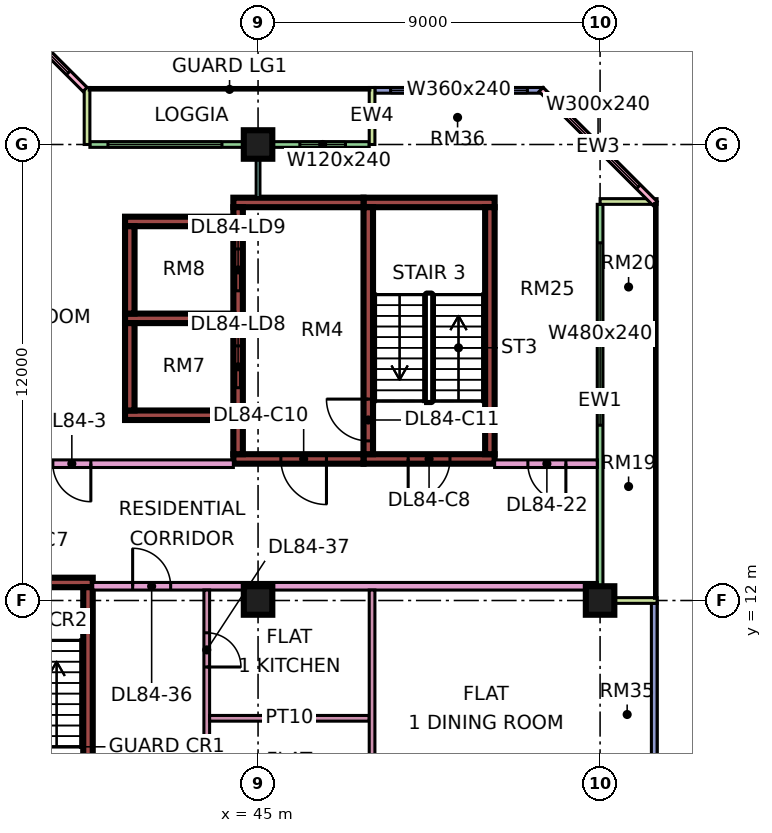
"""IFC4 building model, lengths in metres.
Left out: names, types, materials, properties, quantities, classifications, styles, units other than length and angle.
Written with IfcOpenShell. Run it as: python <this file> out.ifc"""

import sys

from ifc_helpers import new_model, si_unit, direction, frame, frame_2d, origin, origin_2d, place, context, subcontext, project, spatial, rectangle, extrude, element, fill, save


model = new_model("IFC4")
c1 = context("Model", 3, precision=1e-05, world=origin(), true_north=direction((0.0, 1.0)))
c2 = subcontext(c1, "Body", "Model", "MODEL_VIEW")
j1 = project(units=[si_unit("LENGTHUNIT", "METRE"), si_unit("PLANEANGLEUNIT", "RADIAN")], contexts=[c1])
p1 = place(None, origin())
s1 = spatial("IfcSite", under=j1, at=p1, CompositionType="ELEMENT")
p2 = place(p1, origin())
s2 = spatial("IfcBuilding", under=s1, at=p2, CompositionType="ELEMENT")
p3 = place(p2, frame((0.0, 0.0, 361.4)))
s3 = spatial("IfcBuildingStorey", under=s2, at=p3, CompositionType="ELEMENT", Elevation=361.4)
for number, where, z_axis, x_axis in (
    (1, (45.0, 12.0, 0.0), (0.0, 0.0, 1.0), (1.0, 0.0, 0.0)),
    (2, (45.0, 24.0, 0.0), (0.0, 0.0, 1.0), (1.0, 0.0, 0.0)),
    (3, (54.0, 12.0, 0.0), (0.0, 0.0, 1.0), (1.0, 0.0, 0.0)),
):
    element("IfcColumn", number, at=place(p3, frame(where, z_axis=z_axis, x_axis=x_axis)), inside=s3, PredefinedType="COLUMN", context=c2, shape_type="SweptSolid", body=[
        extrude(rectangle(XDim=0.75, YDim=0.75, at=origin_2d()), origin(), (0.0, 0.0, 1.0), 3.75),
    ])
p4 = place(p3, frame((36.375, 12.475, 0.0), z_axis=(0.0, 0.0, 1.0), x_axis=(1.0, 0.0, 0.0)))
e4 = element("IfcWall", 4, at=p4, inside=s3, PredefinedType="SHEAR", context=c2, shape_type="SweptSolid", body=[
    extrude(rectangle(XDim=4.275, YDim=0.25, at=frame_2d((2.137, 0.0))), origin(), (0.0, 0.0, 1.0), 3.75),
])
p5 = place(p4, frame((2.0, 0.0, 0.0)))
e5 = element("IfcOpeningElement", 5, at=p5, cuts=e4, PredefinedType="OPENING", context=c2, shape_type="SweptSolid", body=[
    extrude(rectangle(XDim=1.1, YDim=2.2, at=frame_2d((0.55, 1.1))), frame((0.0, 0.135, 0.0), z_axis=(0.0, -1.0, 0.0), x_axis=(1.0, 0.0, 0.0)), (0.0, 0.0, 1.0), 0.27),
])
p6 = place(p3, frame((40.525, 5.85, 0.0), z_axis=(0.0, 0.0, 1.0), x_axis=(0.0, 1.0, 0.0)))
e6 = element("IfcWall", 6, at=p6, inside=s3, PredefinedType="SHEAR", context=c2, shape_type="SweptSolid", body=[
    extrude(rectangle(XDim=6.5, YDim=0.25, at=frame_2d((3.25, 0.0))), origin(), (0.0, 0.0, 1.0), 3.75),
])
p7 = place(p3, frame((47.775, 15.725, 0.0), z_axis=(0.0, 0.0, 1.0), x_axis=(1.0, 0.0, 0.0)))
e7 = element("IfcWall", 7, at=p7, inside=s3, PredefinedType="SHEAR", context=c2, shape_type="SweptSolid", body=[
    extrude(rectangle(XDim=3.45, YDim=0.25, at=frame_2d((1.725, 0.0))), origin(), (0.0, 0.0, 1.0), 3.75),
])
p8 = place(p7, frame((1.175, 0.0, 0.0)))
e8 = element("IfcOpeningElement", 8, at=p8, cuts=e7, PredefinedType="OPENING", context=c2, shape_type="SweptSolid", body=[
    extrude(rectangle(XDim=1.1, YDim=2.2, at=frame_2d((0.55, 1.1))), frame((0.0, 0.135, 0.0), z_axis=(0.0, -1.0, 0.0), x_axis=(1.0, 0.0, 0.0)), (0.0, 0.0, 1.0), 0.27),
])
p9 = place(p3, frame((47.775, 22.475, 0.0), z_axis=(0.0, 0.0, 1.0), x_axis=(1.0, 0.0, 0.0)))
e9 = element("IfcWall", 9, at=p9, inside=s3, PredefinedType="SHEAR", context=c2, shape_type="SweptSolid", body=[
    extrude(rectangle(XDim=3.45, YDim=0.25, at=frame_2d((1.725, 0.0))), origin(), (0.0, 0.0, 1.0), 3.75),
])
p10 = place(p3, frame((47.9, 15.85, 0.0), z_axis=(0.0, 0.0, 1.0), x_axis=(0.0, 1.0, 0.0)))
e10 = element("IfcWall", 10, at=p10, inside=s3, PredefinedType="SHEAR", context=c2, shape_type="SweptSolid", body=[
    extrude(rectangle(XDim=6.5, YDim=0.25, at=frame_2d((3.25, 0.0))), origin(), (0.0, 0.0, 1.0), 3.75),
])
p11 = place(p10, frame((0.35, 0.0, 0.0)))
e11 = element("IfcOpeningElement", 11, at=p11, cuts=e10, PredefinedType="OPENING", context=c2, shape_type="SweptSolid", body=[
    extrude(rectangle(XDim=1.1, YDim=2.2, at=frame_2d((0.55, 1.1))), frame((0.0, 0.135, 0.0), z_axis=(0.0, -1.0, 0.0), x_axis=(1.0, 0.0, 0.0)), (0.0, 0.0, 1.0), 0.27),
])
p12 = place(p3, frame((51.1, 15.85, 0.0), z_axis=(0.0, 0.0, 1.0), x_axis=(0.0, 1.0, 0.0)))
e12 = element("IfcWall", 12, at=p12, inside=s3, PredefinedType="SHEAR", context=c2, shape_type="SweptSolid", body=[
    extrude(rectangle(XDim=6.5, YDim=0.25, at=frame_2d((3.25, 0.0))), origin(), (0.0, 0.0, 1.0), 3.75),
])
p13 = place(p3, frame((44.35, 15.725, 0.0), z_axis=(0.0, 0.0, 1.0), x_axis=(1.0, 0.0, 0.0)))
e13 = element("IfcWall", 13, at=p13, inside=s3, PredefinedType="SHEAR", context=c2, shape_type="SweptSolid", body=[
    extrude(rectangle(XDim=3.425, YDim=0.25, at=frame_2d((1.712, 0.0))), origin(), (0.0, 0.0, 1.0), 3.75),
])
p14 = place(p13, frame((1.25, 0.0, 0.0)))
e14 = element("IfcOpeningElement", 14, at=p14, cuts=e13, PredefinedType="OPENING", context=c2, shape_type="SweptSolid", body=[
    extrude(rectangle(XDim=1.2, YDim=2.2, at=frame_2d((0.6, 1.1))), frame((0.0, 0.135, 0.0), z_axis=(0.0, -1.0, 0.0), x_axis=(1.0, 0.0, 0.0)), (0.0, 0.0, 1.0), 0.27),
])
p15 = place(p3, frame((44.35, 22.475, 0.0), z_axis=(0.0, 0.0, 1.0), x_axis=(1.0, 0.0, 0.0)))
e15 = element("IfcWall", 15, at=p15, inside=s3, PredefinedType="SHEAR", context=c2, shape_type="SweptSolid", body=[
    extrude(rectangle(XDim=3.425, YDim=0.25, at=frame_2d((1.712, 0.0))), origin(), (0.0, 0.0, 1.0), 3.75),
])
p16 = place(p3, frame((44.475, 15.85, 0.0), z_axis=(0.0, 0.0, 1.0), x_axis=(0.0, 1.0, 0.0)))
e16 = element("IfcWall", 16, at=p16, inside=s3, PredefinedType="SHEAR", context=c2, shape_type="SweptSolid", body=[
    extrude(rectangle(XDim=6.5, YDim=0.25, at=frame_2d((3.25, 0.0))), origin(), (0.0, 0.0, 1.0), 3.75),
])
p17 = place(p16, frame((1.75, 0.0, 0.0)))
e17 = element("IfcOpeningElement", 17, at=p17, cuts=e16, PredefinedType="OPENING", context=c2, shape_type="SweptSolid", body=[
    extrude(rectangle(XDim=1.1, YDim=2.2, at=frame_2d((0.55, 1.1))), frame((0.0, 0.135, 0.0), z_axis=(0.0, -1.0, 0.0), x_axis=(1.0, 0.0, 0.0)), (0.0, 0.0, 1.0), 0.27),
])
p18 = place(p16, frame((4.3, 0.0, 0.0)))
e18 = element("IfcOpeningElement", 18, at=p18, cuts=e16, PredefinedType="OPENING", context=c2, shape_type="SweptSolid", body=[
    extrude(rectangle(XDim=1.1, YDim=2.2, at=frame_2d((0.55, 1.1))), frame((0.0, 0.135, 0.0), z_axis=(0.0, -1.0, 0.0), x_axis=(1.0, 0.0, 0.0)), (0.0, 0.0, 1.0), 0.27),
])
for number, where, z_axis, x_axis in (
    (19, (41.5, 16.875, 0.0), (0.0, 0.0, 1.0), (1.0, 0.0, 0.0)),
    (20, (41.5, 19.425, 0.0), (0.0, 0.0, 1.0), (1.0, 0.0, 0.0)),
    (21, (41.5, 21.975, 0.0), (0.0, 0.0, 1.0), (1.0, 0.0, 0.0)),
):
    element("IfcWall", number, at=place(p3, frame(where, z_axis=z_axis, x_axis=x_axis)), inside=s3, PredefinedType="SHEAR", context=c2, shape_type="SweptSolid", body=[
        extrude(rectangle(XDim=2.85, YDim=0.25, at=frame_2d((1.425, 0.0))), origin(), (0.0, 0.0, 1.0), 3.75),
    ])
for number, where, z_axis, x_axis in (
    (22, (41.625, 17.0, 0.0), (0.0, 0.0, 1.0), (0.0, 1.0, 0.0)),
    (23, (41.625, 19.55, 0.0), (0.0, 0.0, 1.0), (0.0, 1.0, 0.0)),
):
    element("IfcWall", number, at=place(p3, frame(where, z_axis=z_axis, x_axis=x_axis)), inside=s3, PredefinedType="SHEAR", context=c2, shape_type="SweptSolid", body=[
        extrude(rectangle(XDim=2.3, YDim=0.25, at=frame_2d((1.15, 0.0))), origin(), (0.0, 0.0, 1.0), 3.75),
    ])
p19 = place(p3, frame((52.5, 25.425, 0.0), z_axis=(0.0, 0.0, 1.0), x_axis=(-1.0, 0.0, 0.0)))
e24 = element("IfcWall", 24, at=p19, inside=s3, PredefinedType="SOLIDWALL", context=c2, shape_type="SweptSolid", body=[
    extrude(rectangle(XDim=4.425, YDim=0.15, at=frame_2d((2.212, 0.0))), origin(), (0.0, 0.0, 1.0), 3.35),
])
p20 = place(p19, frame((0.413, 0.0, 0.45)))
e25 = element("IfcOpeningElement", 25, at=p20, cuts=e24, PredefinedType="OPENING", context=c2, shape_type="SweptSolid", body=[
    extrude(rectangle(XDim=3.6, YDim=2.4, at=frame_2d((1.8, 1.2))), frame((0.0, 0.085, 0.0), z_axis=(0.0, -1.0, 0.0), x_axis=(1.0, 0.0, 0.0)), (0.0, 0.0, 1.0), 0.17),
])
p21 = place(p3, frame((47.925, 24.0, 0.0), z_axis=(0.0, 0.0, 1.0), x_axis=(-1.0, 0.0, 0.0)))
e26 = element("IfcWall", 26, at=p21, inside=s3, PredefinedType="SOLIDWALL", context=c2, shape_type="SweptSolid", body=[
    extrude(rectangle(XDim=7.35, YDim=0.15, at=frame_2d((3.675, 0.0))), origin(), (0.0, 0.0, 1.0), 3.35),
])
p22 = place(p21, frame((0.625, 0.0, 0.45)))
e27 = element("IfcOpeningElement", 27, at=p22, cuts=e26, PredefinedType="OPENING", context=c2, shape_type="SweptSolid", body=[
    extrude(rectangle(XDim=1.2, YDim=2.4, at=frame_2d((0.6, 1.2))), frame((0.0, 0.085, 0.0), z_axis=(0.0, -1.0, 0.0), x_axis=(1.0, 0.0, 0.0)), (0.0, 0.0, 1.0), 0.17),
])
p23 = place(p21, frame((3.875, 0.0, 0.45)))
e28 = element("IfcOpeningElement", 28, at=p23, cuts=e26, PredefinedType="OPENING", context=c2, shape_type="SweptSolid", body=[
    extrude(rectangle(XDim=3.0, YDim=2.4, at=frame_2d((1.5, 1.2))), frame((0.0, 0.085, 0.0), z_axis=(0.0, -1.0, 0.0), x_axis=(1.0, 0.0, 0.0)), (0.0, 0.0, 1.0), 0.17),
])
for number, where, z_axis, x_axis in (
    (29, (48.0, 25.5, 0.0), (0.0, 0.0, 1.0), (0.0, -1.0, 0.0)),
    (30, (40.5, 25.5, 0.0), (0.0, 0.0, 1.0), (0.0, -1.0, 0.0)),
):
    element("IfcWall", number, at=place(p3, frame(where, z_axis=z_axis, x_axis=x_axis)), inside=s3, PredefinedType="SOLIDWALL", context=c2, shape_type="SweptSolid", body=[
        extrude(rectangle(XDim=1.5, YDim=0.15, at=frame_2d((0.75, 0.0))), origin(), (0.0, 0.0, 1.0), 3.35),
    ])
p24 = place(p3, frame((40.447, 25.447, 0.0), z_axis=(0.0, 0.0, 1.0), x_axis=(-0.707106781187, 0.707106781187, 0.0)))
e31 = element("IfcWall", 31, at=p24, inside=s3, PredefinedType="SOLIDWALL", context=c2, shape_type="SweptSolid", body=[
    extrude(rectangle(XDim=4.243, YDim=0.15, at=frame_2d((2.121, 0.0))), origin(), (0.0, 0.0, 1.0), 3.35),
])
p25 = place(p24, frame((0.621, 0.0, 0.45)))
e32 = element("IfcOpeningElement", 32, at=p25, cuts=e31, PredefinedType="OPENING", context=c2, shape_type="SweptSolid", body=[
    extrude(rectangle(XDim=3.0, YDim=2.4, at=frame_2d((1.5, 1.2))), frame((0.0, 0.085, 0.0), z_axis=(0.0, -1.0, 0.0), x_axis=(1.0, 0.0, 0.0)), (0.0, 0.0, 1.0), 0.17),
])
p26 = place(p3, frame((55.425, 1.5, 0.0), z_axis=(0.0, 0.0, 1.0), x_axis=(0.0, 1.0, 0.0)))
e33 = element("IfcWall", 33, at=p26, inside=s3, PredefinedType="SOLIDWALL", context=c2, shape_type="SweptSolid", body=[
    extrude(rectangle(XDim=10.425, YDim=0.15, at=frame_2d((5.212, 0.0))), origin(), (0.0, 0.0, 1.0), 3.35),
])
p27 = place(p26, frame((0.4, 0.0, 0.45)))
e34 = element("IfcOpeningElement", 34, at=p27, cuts=e33, PredefinedType="OPENING", context=c2, shape_type="SweptSolid", body=[
    extrude(rectangle(XDim=2.4, YDim=2.4, at=frame_2d((1.2, 1.2))), frame((0.0, 0.085, 0.0), z_axis=(0.0, -1.0, 0.0), x_axis=(1.0, 0.0, 0.0)), (0.0, 0.0, 1.0), 0.17),
])
p28 = place(p3, frame((54.0, 12.075, 0.0), z_axis=(0.0, 0.0, 1.0), x_axis=(0.0, 1.0, 0.0)))
e35 = element("IfcWall", 35, at=p28, inside=s3, PredefinedType="SOLIDWALL", context=c2, shape_type="SweptSolid", body=[
    extrude(rectangle(XDim=10.35, YDim=0.15, at=frame_2d((5.175, 0.0))), origin(), (0.0, 0.0, 1.0), 3.35),
])
p29 = place(p28, frame((4.538, 0.0, 0.45)))
e36 = element("IfcOpeningElement", 36, at=p29, cuts=e35, PredefinedType="OPENING", context=c2, shape_type="SweptSolid", body=[
    extrude(rectangle(XDim=4.8, YDim=2.4, at=frame_2d((2.4, 1.2))), frame((0.0, 0.085, 0.0), z_axis=(0.0, -1.0, 0.0), x_axis=(1.0, 0.0, 0.0)), (0.0, 0.0, 1.0), 0.17),
])
for number, where, z_axis, x_axis in (
    (37, (55.5, 12.0, 0.0), (0.0, 0.0, 1.0), (-1.0, 0.0, 0.0)),
    (38, (55.5, 22.5, 0.0), (0.0, 0.0, 1.0), (-1.0, 0.0, 0.0)),
):
    element("IfcWall", number, at=place(p3, frame(where, z_axis=z_axis, x_axis=x_axis)), inside=s3, PredefinedType="SOLIDWALL", context=c2, shape_type="SweptSolid", body=[
        extrude(rectangle(XDim=1.5, YDim=0.15, at=frame_2d((0.75, 0.0))), origin(), (0.0, 0.0, 1.0), 3.35),
    ])
p30 = place(p3, frame((55.447, 22.447, 0.0), z_axis=(0.0, 0.0, 1.0), x_axis=(-0.707106781187, 0.707106781187, 0.0)))
e39 = element("IfcWall", 39, at=p30, inside=s3, PredefinedType="SOLIDWALL", context=c2, shape_type="SweptSolid", body=[
    extrude(rectangle(XDim=4.243, YDim=0.15, at=frame_2d((2.121, 0.0))), origin(), (0.0, 0.0, 1.0), 3.35),
])
p31 = place(p30, frame((0.621, 0.0, 0.45)))
e40 = element("IfcOpeningElement", 40, at=p31, cuts=e39, PredefinedType="OPENING", context=c2, shape_type="SweptSolid", body=[
    extrude(rectangle(XDim=3.0, YDim=2.4, at=frame_2d((1.5, 1.2))), frame((0.0, 0.085, 0.0), z_axis=(0.0, -1.0, 0.0), x_axis=(1.0, 0.0, 0.0)), (0.0, 0.0, 1.0), 0.17),
])
p32 = place(p3, frame((34.0, 15.6, 0.0), z_axis=(0.0, 0.0, 1.0), x_axis=(1.0, 0.0, 0.0)))
e41 = element("IfcWall", 41, at=p32, inside=s3, PredefinedType="PARTITIONING", context=c2, shape_type="SweptSolid", body=[
    extrude(rectangle(XDim=10.35, YDim=0.2, at=frame_2d((5.175, 0.0))), origin(), (0.0, 0.0, 1.0), 3.35),
])
p33 = place(p32, frame((5.6, 0.0, 0.0)))
e42 = element("IfcOpeningElement", 42, at=p33, cuts=e41, PredefinedType="OPENING", context=c2, shape_type="SweptSolid", body=[
    extrude(rectangle(XDim=1.0, YDim=2.1, at=frame_2d((0.5, 1.05))), frame((0.0, 0.11, 0.0), z_axis=(0.0, -1.0, 0.0), x_axis=(1.0, 0.0, 0.0)), (0.0, 0.0, 1.0), 0.22),
])
p34 = place(p32, frame((0.45, 0.0, 0.0)))
e43 = element("IfcOpeningElement", 43, at=p34, cuts=e41, PredefinedType="OPENING", context=c2, shape_type="SweptSolid", body=[
    extrude(rectangle(XDim=1.2, YDim=2.1, at=frame_2d((0.6, 1.05))), frame((0.0, 0.11, 0.0), z_axis=(0.0, -1.0, 0.0), x_axis=(1.0, 0.0, 0.0)), (0.0, 0.0, 1.0), 0.22),
])
p35 = place(p3, frame((40.65, 12.375, 0.0), z_axis=(0.0, 0.0, 1.0), x_axis=(1.0, 0.0, 0.0)))
e44 = element("IfcWall", 44, at=p35, inside=s3, PredefinedType="PARTITIONING", context=c2, shape_type="SweptSolid", body=[
    extrude(rectangle(XDim=13.276, YDim=0.2, at=frame_2d((6.638, 0.0))), origin(), (0.0, 0.0, 1.0), 3.35),
])
p36 = place(p35, frame((1.05, 0.0, 0.0)))
e45 = element("IfcOpeningElement", 45, at=p36, cuts=e44, PredefinedType="OPENING", context=c2, shape_type="SweptSolid", body=[
    extrude(rectangle(XDim=1.0, YDim=2.1, at=frame_2d((0.5, 1.05))), frame((0.0, 0.11, 0.0), z_axis=(0.0, -1.0, 0.0), x_axis=(1.0, 0.0, 0.0)), (0.0, 0.0, 1.0), 0.22),
])
p37 = place(p3, frame((43.65, 5.975, 0.0), z_axis=(0.0, 0.0, 1.0), x_axis=(0.0, 1.0, 0.0)))
e46 = element("IfcWall", 46, at=p37, inside=s3, PredefinedType="PARTITIONING", context=c2, shape_type="SweptSolid", body=[
    extrude(rectangle(XDim=6.3, YDim=0.15, at=frame_2d((3.15, 0.0))), origin(), (0.0, 0.0, 1.0), 3.35),
])
p38 = place(p37, frame((4.275, 0.0, 0.0)))
e47 = element("IfcOpeningElement", 47, at=p38, cuts=e46, PredefinedType="OPENING", context=c2, shape_type="SweptSolid", body=[
    extrude(rectangle(XDim=0.9, YDim=2.1, at=frame_2d((0.45, 1.05))), frame((0.0, 0.085, 0.0), z_axis=(0.0, -1.0, 0.0), x_axis=(1.0, 0.0, 0.0)), (0.0, 0.0, 1.0), 0.17),
])
p39 = place(p3, frame((43.725, 8.9, 0.0), z_axis=(0.0, 0.0, 1.0), x_axis=(1.0, 0.0, 0.0)))
e48 = element("IfcWall", 48, at=p39, inside=s3, PredefinedType="PARTITIONING", context=c2, shape_type="SweptSolid", body=[
    extrude(rectangle(XDim=4.2, YDim=0.15, at=frame_2d((2.1, 0.0))), origin(), (0.0, 0.0, 1.0), 3.35),
])
p40 = place(p3, frame((45.0, 22.6, 0.0), z_axis=(0.0, 0.0, 1.0), x_axis=(0.0, 1.0, 0.0)))
e49 = element("IfcWall", 49, at=p40, inside=s3, PredefinedType="PARTITIONING", context=c2, shape_type="SweptSolid", body=[
    extrude(rectangle(XDim=1.326, YDim=0.1, at=frame_2d((0.663, 0.0))), origin(), (0.0, 0.0, 1.0), 3.35),
])
p41 = place(p3, frame((48.0, 5.975, 0.0), z_axis=(0.0, 0.0, 1.0), x_axis=(0.0, 1.0, 0.0)))
e50 = element("IfcWall", 50, at=p41, inside=s3, PredefinedType="PARTITIONING", context=c2, shape_type="SweptSolid", body=[
    extrude(rectangle(XDim=6.3, YDim=0.15, at=frame_2d((3.15, 0.0))), origin(), (0.0, 0.0, 1.0), 3.35),
])
p42 = place(p3, frame((51.225, 15.6, 0.0), z_axis=(0.0, 0.0, 1.0), x_axis=(1.0, 0.0, 0.0)))
e51 = element("IfcWall", 51, at=p42, inside=s3, PredefinedType="PARTITIONING", context=c2, shape_type="SweptSolid", body=[
    extrude(rectangle(XDim=2.701, YDim=0.2, at=frame_2d((1.351, 0.0))), origin(), (0.0, 0.0, 1.0), 3.35),
])
p43 = place(p42, frame((0.875, 0.0, 0.0)))
e52 = element("IfcOpeningElement", 52, at=p43, cuts=e51, PredefinedType="OPENING", context=c2, shape_type="SweptSolid", body=[
    extrude(rectangle(XDim=1.0, YDim=2.1, at=frame_2d((0.5, 1.05))), frame((0.0, 0.11, 0.0), z_axis=(0.0, -1.0, 0.0), x_axis=(1.0, 0.0, 0.0)), (0.0, 0.0, 1.0), 0.22),
])
p44 = place(p20, origin())
e53 = element("IfcWindow", 53, at=p44, inside=s3, PartitioningType="SINGLE_PANEL", PredefinedType="WINDOW", context=c2, shape_type="SweptSolid", body=[
    extrude(rectangle(XDim=3.6, YDim=2.4, at=frame_2d((1.8, 1.2))), frame((0.0, 0.03, 0.0), z_axis=(0.0, -1.0, 0.0), x_axis=(1.0, 0.0, 0.0)), (0.0, 0.0, 1.0), 0.06),
])
fill(e25, e53)
p45 = place(p22, origin())
e54 = element("IfcWindow", 54, at=p45, inside=s3, PartitioningType="SINGLE_PANEL", PredefinedType="WINDOW", context=c2, shape_type="SweptSolid", body=[
    extrude(rectangle(XDim=1.2, YDim=2.4, at=frame_2d((0.6, 1.2))), frame((0.0, 0.03, 0.0), z_axis=(0.0, -1.0, 0.0), x_axis=(1.0, 0.0, 0.0)), (0.0, 0.0, 1.0), 0.06),
])
fill(e27, e54)
p46 = place(p23, origin())
e55 = element("IfcWindow", 55, at=p46, inside=s3, PartitioningType="SINGLE_PANEL", PredefinedType="WINDOW", context=c2, shape_type="SweptSolid", body=[
    extrude(rectangle(XDim=3.0, YDim=2.4, at=frame_2d((1.5, 1.2))), frame((0.0, 0.03, 0.0), z_axis=(0.0, -1.0, 0.0), x_axis=(1.0, 0.0, 0.0)), (0.0, 0.0, 1.0), 0.06),
])
fill(e28, e55)
p47 = place(p25, origin())
e56 = element("IfcWindow", 56, at=p47, inside=s3, PartitioningType="SINGLE_PANEL", PredefinedType="WINDOW", context=c2, shape_type="SweptSolid", body=[
    extrude(rectangle(XDim=3.0, YDim=2.4, at=frame_2d((1.5, 1.2))), frame((0.0, 0.03, 0.0), z_axis=(0.0, -1.0, 0.0), x_axis=(1.0, 0.0, 0.0)), (0.0, 0.0, 1.0), 0.06),
])
fill(e32, e56)
p48 = place(p29, origin())
e57 = element("IfcWindow", 57, at=p48, inside=s3, PartitioningType="SINGLE_PANEL", PredefinedType="WINDOW", context=c2, shape_type="SweptSolid", body=[
    extrude(rectangle(XDim=4.8, YDim=2.4, at=frame_2d((2.4, 1.2))), frame((0.0, 0.03, 0.0), z_axis=(0.0, -1.0, 0.0), x_axis=(1.0, 0.0, 0.0)), (0.0, 0.0, 1.0), 0.06),
])
fill(e36, e57)
p49 = place(p31, origin())
e58 = element("IfcWindow", 58, at=p49, inside=s3, PartitioningType="SINGLE_PANEL", PredefinedType="WINDOW", context=c2, shape_type="SweptSolid", body=[
    extrude(rectangle(XDim=3.0, YDim=2.4, at=frame_2d((1.5, 1.2))), frame((0.0, 0.03, 0.0), z_axis=(0.0, -1.0, 0.0), x_axis=(1.0, 0.0, 0.0)), (0.0, 0.0, 1.0), 0.06),
])
fill(e40, e58)
p50 = place(p8, frame((1.1, 0.0, 0.0), z_axis=(0.0, 0.0, 1.0), x_axis=(-1.0, 0.0, 0.0)))
e59 = element("IfcDoor", 59, at=p50, inside=s3, OperationType="SINGLE_SWING_LEFT", PredefinedType="DOOR", context=c2, shape_type="SweptSolid", body=[
    extrude(rectangle(XDim=1.1, YDim=2.2, at=frame_2d((0.55, 1.1))), frame((0.0, 0.025, 0.0), z_axis=(0.0, -1.0, 0.0), x_axis=(1.0, 0.0, 0.0)), (0.0, 0.0, 1.0), 0.05),
])
fill(e8, e59)
p51 = place(p14, origin())
e60 = element("IfcDoor", 60, at=p51, inside=s3, OperationType="SINGLE_SWING_RIGHT", PredefinedType="DOOR", context=c2, shape_type="SweptSolid", body=[
    extrude(rectangle(XDim=1.2, YDim=2.2, at=frame_2d((0.6, 1.1))), frame((0.0, 0.025, 0.0), z_axis=(0.0, -1.0, 0.0), x_axis=(1.0, 0.0, 0.0)), (0.0, 0.0, 1.0), 0.05),
])
fill(e14, e60)
p52 = place(p11, frame((1.1, 0.0, 0.0), z_axis=(0.0, 0.0, 1.0), x_axis=(-1.0, 0.0, 0.0)))
e61 = element("IfcDoor", 61, at=p52, inside=s3, OperationType="SINGLE_SWING_RIGHT", PredefinedType="DOOR", context=c2, shape_type="SweptSolid", body=[
    extrude(rectangle(XDim=1.1, YDim=2.2, at=frame_2d((0.55, 1.1))), frame((0.0, 0.025, 0.0), z_axis=(0.0, -1.0, 0.0), x_axis=(1.0, 0.0, 0.0)), (0.0, 0.0, 1.0), 0.05),
])
fill(e11, e61)
p53 = place(p17, origin())
e62 = element("IfcDoor", 62, at=p53, inside=s3, OperationType="DOUBLE_DOOR_SLIDING", PredefinedType="DOOR", context=c2, shape_type="SweptSolid", body=[
    extrude(rectangle(XDim=1.1, YDim=2.2, at=frame_2d((0.55, 1.1))), frame((0.0, 0.025, 0.0), z_axis=(0.0, -1.0, 0.0), x_axis=(1.0, 0.0, 0.0)), (0.0, 0.0, 1.0), 0.05),
])
fill(e17, e62)
p54 = place(p18, origin())
e63 = element("IfcDoor", 63, at=p54, inside=s3, OperationType="DOUBLE_DOOR_SLIDING", PredefinedType="DOOR", context=c2, shape_type="SweptSolid", body=[
    extrude(rectangle(XDim=1.1, YDim=2.2, at=frame_2d((0.55, 1.1))), frame((0.0, 0.025, 0.0), z_axis=(0.0, -1.0, 0.0), x_axis=(1.0, 0.0, 0.0)), (0.0, 0.0, 1.0), 0.05),
])
fill(e18, e63)
p55 = place(p33, origin())
e64 = element("IfcDoor", 64, at=p55, inside=s3, OperationType="SINGLE_SWING_RIGHT", PredefinedType="DOOR", context=c2, shape_type="SweptSolid", body=[
    extrude(rectangle(XDim=1.0, YDim=2.1, at=frame_2d((0.5, 1.05))), frame((0.0, 0.025, 0.0), z_axis=(0.0, -1.0, 0.0), x_axis=(1.0, 0.0, 0.0)), (0.0, 0.0, 1.0), 0.05),
])
fill(e42, e64)
p56 = place(p43, origin())
e65 = element("IfcDoor", 65, at=p56, inside=s3, OperationType="SINGLE_SWING_RIGHT", PredefinedType="DOOR", context=c2, shape_type="SweptSolid", body=[
    extrude(rectangle(XDim=1.0, YDim=2.1, at=frame_2d((0.5, 1.05))), frame((0.0, 0.025, 0.0), z_axis=(0.0, -1.0, 0.0), x_axis=(1.0, 0.0, 0.0)), (0.0, 0.0, 1.0), 0.05),
])
fill(e52, e65)
p57 = place(p36, origin())
e66 = element("IfcDoor", 66, at=p57, inside=s3, OperationType="SINGLE_SWING_LEFT", PredefinedType="DOOR", context=c2, shape_type="SweptSolid", body=[
    extrude(rectangle(XDim=1.0, YDim=2.1, at=frame_2d((0.5, 1.05))), frame((0.0, 0.025, 0.0), z_axis=(0.0, -1.0, 0.0), x_axis=(1.0, 0.0, 0.0)), (0.0, 0.0, 1.0), 0.05),
])
fill(e45, e66)
p58 = place(p38, frame((0.9, 0.0, 0.0), z_axis=(0.0, 0.0, 1.0), x_axis=(-1.0, 0.0, 0.0)))
e67 = element("IfcDoor", 67, at=p58, inside=s3, OperationType="SINGLE_SWING_LEFT", PredefinedType="DOOR", context=c2, shape_type="SweptSolid", body=[
    extrude(rectangle(XDim=0.9, YDim=2.1, at=frame_2d((0.45, 1.05))), frame((0.0, 0.025, 0.0), z_axis=(0.0, -1.0, 0.0), x_axis=(1.0, 0.0, 0.0)), (0.0, 0.0, 1.0), 0.05),
])
fill(e47, e67)
save(model, sys.argv[1])
